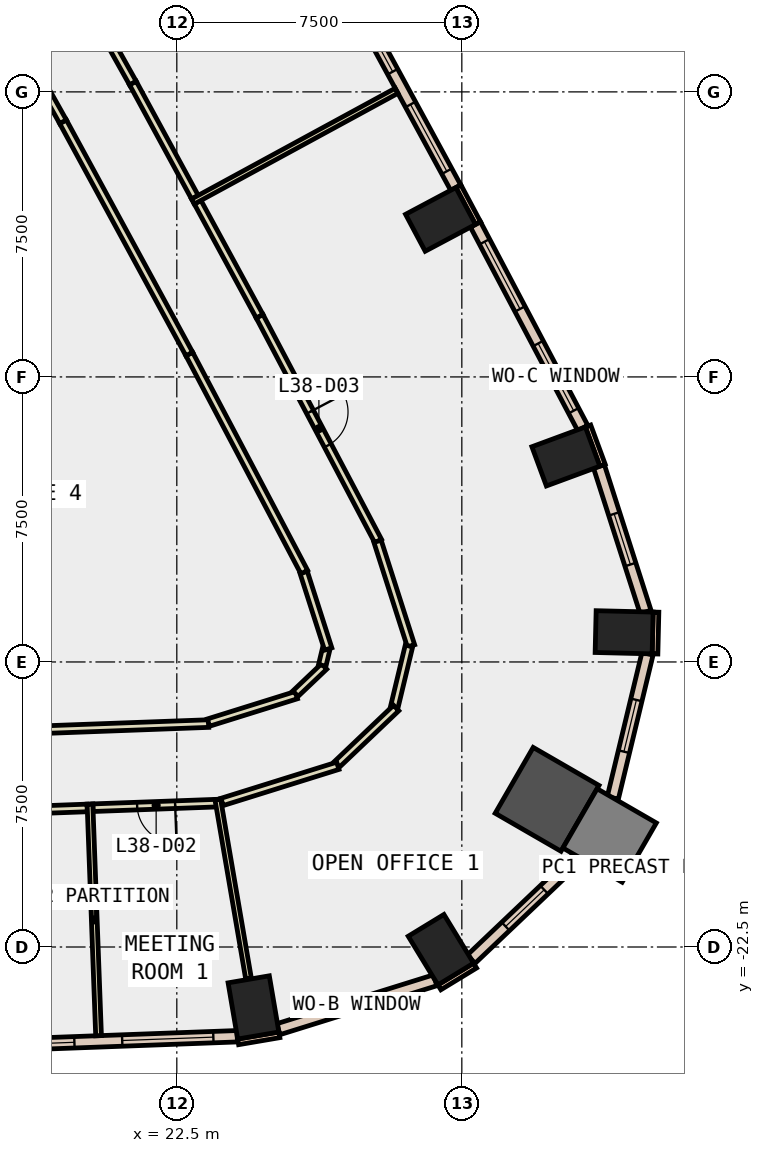
"""IFC4 building model, lengths in metres.
Left out: names, types, materials, properties, quantities, classifications, styles, units other than length and angle.
Written with IfcOpenShell. Run it as: python <this file> out.ifc"""

import sys

from ifc_helpers import new_model, si_unit, direction, frame, frame_2d, origin, origin_2d, place, context, subcontext, project, spatial, rectangle, extrude, element, fill, save


model = new_model("IFC4")
c1 = context("Model", 3, precision=1e-05, world=origin(), true_north=direction((0.0, 1.0)))
c2 = subcontext(c1, "Body", "Model", "MODEL_VIEW")
j1 = project(units=[si_unit("LENGTHUNIT", "METRE"), si_unit("PLANEANGLEUNIT", "RADIAN")], contexts=[c1])
p1 = place(None, origin())
s1 = spatial("IfcSite", under=j1, at=p1, CompositionType="ELEMENT")
p2 = place(p1, origin())
s2 = spatial("IfcBuilding", under=s1, at=p2, CompositionType="ELEMENT")
p3 = place(p2, frame((0.0, 0.0, 171.8)))
s3 = spatial("IfcBuildingStorey", under=s2, at=p3, CompositionType="ELEMENT", Elevation=171.8)
for number, where, z_axis, x_axis in (
    (1, (24.518, -24.09, -0.4), (0.0, 0.0, 1.0), (0.986, 0.168, 0.0)),
    (2, (29.45, -22.571, -0.4), (0.0, 0.0, 1.0), (0.854, 0.521, 0.0)),
):
    element("IfcColumn", number, at=place(p3, frame(where, z_axis=z_axis, x_axis=x_axis)), inside=s3, PredefinedType="COLUMN", context=c2, shape_type="SweptSolid", body=[
        extrude(rectangle(XDim=1.1, YDim=1.5, at=origin_2d()), origin(), (0.0, 0.0, 1.0), 4.2),
    ])
p4 = place(p3, frame((32.244, -18.615, -0.4), z_axis=(0.0, 0.0, 1.0), x_axis=(-0.866025403784, 0.5, 0.0)))
e3 = element("IfcColumn", 3, at=p4, inside=s3, PredefinedType="COLUMN", context=c2, shape_type="SweptSolid", body=[
    extrude(rectangle(XDim=2.0, YDim=2.0, at=origin_2d()), origin(), (0.0, 0.0, 1.0), 4.2),
])
for number, where, z_axis, x_axis in (
    (4, (34.271, -14.219, -0.4), (0.0, 0.0, 1.0), (0.024, 1.0, 0.0)),
    (5, (32.738, -9.593, -0.4), (0.0, 0.0, 1.0), (-0.347, 0.938, 0.0)),
    (6, (29.44, -3.355, -0.4), (0.0, 0.0, 1.0), (-0.47, 0.883, 0.0)),
):
    element("IfcColumn", number, at=place(p3, frame(where, z_axis=z_axis, x_axis=x_axis)), inside=s3, PredefinedType="COLUMN", context=c2, shape_type="SweptSolid", body=[
        extrude(rectangle(XDim=1.1, YDim=1.5, at=origin_2d()), origin(), (0.0, 0.0, 1.0), 4.2),
    ])
p5 = place(p3, frame((33.889, -19.565, -0.4), z_axis=(0.0, 0.0, 1.0), x_axis=(-0.866025403784, 0.5, 0.0)))
e7 = element("IfcColumn", 7, at=p5, inside=s3, PredefinedType="COLUMN", context=c2, shape_type="SweptSolid", body=[
    extrude(rectangle(XDim=1.8, YDim=1.8, at=origin_2d()), origin(), (0.0, 0.0, 1.0), 4.2),
])
for number, where, z_axis, x_axis in (
    (8, (33.702, -9.823, 0.0), (0.0, 0.0, 1.0), (-0.346, 0.938, 0.0)),
    (9, (30.426, -3.453, 0.0), (0.0, 0.0, 1.0), (-0.47, 0.883, 0.0)),
):
    element("IfcWall", number, at=place(p3, frame(where, z_axis=z_axis, x_axis=x_axis)), inside=s3, PredefinedType="STANDARD", context=c2, shape_type="SweptSolid", body=[
        extrude(rectangle(XDim=1.1, YDim=0.15, at=frame_2d((0.55, 0.0))), origin(), (0.0, 0.0, 1.0), 3.8),
    ])
p6 = place(p3, frame((24.114, -24.996, 0.0), z_axis=(0.0, 0.0, 1.0), x_axis=(0.985763338892, 0.168138751323, 0.0)))
e10 = element("IfcWall", 10, at=p6, inside=s3, PredefinedType="STANDARD", context=c2, shape_type="SweptSolid", body=[
    extrude(rectangle(XDim=1.101, YDim=0.15, at=frame_2d((0.55, 0.0))), origin(), (0.0, 0.0, 1.0), 3.8),
])
p7 = place(p3, frame((29.41, -23.561, 0.0), z_axis=(0.0, 0.0, 1.0), x_axis=(0.854065628997, 0.520165263514, 0.0)))
e11 = element("IfcWall", 11, at=p7, inside=s3, PredefinedType="STANDARD", context=c2, shape_type="SweptSolid", body=[
    extrude(rectangle(XDim=1.1, YDim=0.15, at=frame_2d((0.55, 0.0))), origin(), (0.0, 0.0, 1.0), 3.8),
])
p8 = place(p3, frame((35.083, -14.789, 0.0), z_axis=(0.0, 0.0, 1.0), x_axis=(0.023517683673, 0.999723421029, 0.0)))
e12 = element("IfcWall", 12, at=p8, inside=s3, PredefinedType="STANDARD", context=c2, shape_type="SweptSolid", body=[
    extrude(rectangle(XDim=1.1, YDim=0.15, at=frame_2d((0.55, 0.0))), origin(), (0.0, 0.0, 1.0), 3.8),
])
p9 = place(p3, frame((16.778, -25.12, 0.0), z_axis=(0.0, 0.0, 1.0), x_axis=(0.999307730926, 0.037202942236, 0.0)))
e13 = element("IfcWall", 13, at=p9, inside=s3, PredefinedType="STANDARD", context=c2, shape_type="SweptSolid", body=[
    extrude(rectangle(XDim=7.317, YDim=0.3, at=frame_2d((3.659, 0.0))), origin(), (0.0, 0.0, 1.0), 3.8),
])
p10 = place(p9, frame((0.629, 0.0, 0.9)))
e14 = element("IfcOpeningElement", 14, at=p10, cuts=e13, PredefinedType="OPENING", context=c2, shape_type="SweptSolid", body=[
    extrude(rectangle(XDim=2.4, YDim=2.6, at=frame_2d((1.2, 1.3))), frame((0.0, 0.16, 0.0), z_axis=(0.0, -1.0, 0.0), x_axis=(1.0, 0.0, 0.0)), (0.0, 0.0, 1.0), 0.32),
])
p11 = place(p9, frame((4.288, 0.0, 0.9)))
e15 = element("IfcOpeningElement", 15, at=p11, cuts=e13, PredefinedType="OPENING", context=c2, shape_type="SweptSolid", body=[
    extrude(rectangle(XDim=2.4, YDim=2.6, at=frame_2d((1.2, 1.3))), frame((0.0, 0.16, 0.0), z_axis=(0.0, -1.0, 0.0), x_axis=(1.0, 0.0, 0.0)), (0.0, 0.0, 1.0), 0.32),
])
p12 = place(p3, frame((25.172, -24.663, 0.0), z_axis=(0.0, 0.0, 1.0), x_axis=(0.954628614874, 0.29779893832, 0.0)))
e16 = element("IfcWall", 16, at=p12, inside=s3, PredefinedType="STANDARD", context=c2, shape_type="SweptSolid", body=[
    extrude(rectangle(XDim=4.322, YDim=0.3, at=frame_2d((2.161, 0.0))), origin(), (0.0, 0.0, 1.0), 3.8),
])
p13 = place(p12, frame((1.461, 0.0, 0.9)))
e17 = element("IfcOpeningElement", 17, at=p13, cuts=e16, PredefinedType="OPENING", context=c2, shape_type="SweptSolid", body=[
    extrude(rectangle(XDim=1.4, YDim=2.6, at=frame_2d((0.7, 1.3))), frame((0.0, 0.16, 0.0), z_axis=(0.0, -1.0, 0.0), x_axis=(1.0, 0.0, 0.0)), (0.0, 0.0, 1.0), 0.32),
])
p14 = place(p3, frame((30.246, -22.821, 0.0), z_axis=(0.0, 0.0, 1.0), x_axis=(0.724807239831, 0.688951714628, 0.0)))
e18 = element("IfcWall", 18, at=p14, inside=s3, PredefinedType="STANDARD", context=c2, shape_type="SweptSolid", body=[
    extrude(rectangle(XDim=3.902, YDim=0.3, at=frame_2d((1.951, 0.0))), origin(), (0.0, 0.0, 1.0), 3.8),
])
p15 = place(p14, frame((1.251, 0.0, 0.9)))
e19 = element("IfcOpeningElement", 19, at=p15, cuts=e18, PredefinedType="OPENING", context=c2, shape_type="SweptSolid", body=[
    extrude(rectangle(XDim=1.4, YDim=2.6, at=frame_2d((0.7, 1.3))), frame((0.0, 0.16, 0.0), z_axis=(0.0, -1.0, 0.0), x_axis=(1.0, 0.0, 0.0)), (0.0, 0.0, 1.0), 0.32),
])
p16 = place(p3, frame((33.973, -18.575, 0.0), z_axis=(0.0, 0.0, 1.0), x_axis=(0.234102046927, 0.972212030179, 0.0)))
e20 = element("IfcWall", 20, at=p16, inside=s3, PredefinedType="STANDARD", context=c2, shape_type="SweptSolid", body=[
    extrude(rectangle(XDim=3.9, YDim=0.3, at=frame_2d((1.95, 0.0))), origin(), (0.0, 0.0, 1.0), 3.8),
])
p17 = place(p16, frame((1.25, 0.0, 0.9)))
e21 = element("IfcOpeningElement", 21, at=p17, cuts=e20, PredefinedType="OPENING", context=c2, shape_type="SweptSolid", body=[
    extrude(rectangle(XDim=1.4, YDim=2.6, at=frame_2d((0.7, 1.3))), frame((0.0, 0.16, 0.0), z_axis=(0.0, -1.0, 0.0), x_axis=(1.0, 0.0, 0.0)), (0.0, 0.0, 1.0), 0.32),
])
p18 = place(p3, frame((34.835, -13.684, 0.0), z_axis=(0.0, 0.0, 1.0), x_axis=(-0.305018133869, 0.952346543025, 0.0)))
e22 = element("IfcWall", 22, at=p18, inside=s3, PredefinedType="STANDARD", context=c2, shape_type="SweptSolid", body=[
    extrude(rectangle(XDim=4.02, YDim=0.3, at=frame_2d((2.01, 0.0))), origin(), (0.0, 0.0, 1.0), 3.8),
])
p19 = place(p18, frame((1.31, 0.0, 0.9)))
e23 = element("IfcOpeningElement", 23, at=p19, cuts=e22, PredefinedType="OPENING", context=c2, shape_type="SweptSolid", body=[
    extrude(rectangle(XDim=1.4, YDim=2.6, at=frame_2d((0.7, 1.3))), frame((0.0, 0.16, 0.0), z_axis=(0.0, -1.0, 0.0), x_axis=(1.0, 0.0, 0.0)), (0.0, 0.0, 1.0), 0.32),
])
p20 = place(p3, frame((33.182, -8.844, 0.0), z_axis=(0.0, 0.0, 1.0), x_axis=(-0.466399410196, 0.884574242316, 0.0)))
e24 = element("IfcWall", 24, at=p20, inside=s3, PredefinedType="STANDARD", context=c2, shape_type="SweptSolid", body=[
    extrude(rectangle(XDim=6.055, YDim=0.3, at=frame_2d((3.027, 0.0))), origin(), (0.0, 0.0, 1.0), 3.8),
])
p21 = place(p20, frame((0.514, 0.0, 0.9)))
e25 = element("IfcOpeningElement", 25, at=p21, cuts=e24, PredefinedType="OPENING", context=c2, shape_type="SweptSolid", body=[
    extrude(rectangle(XDim=2.0, YDim=2.6, at=frame_2d((1.0, 1.3))), frame((0.0, 0.16, 0.0), z_axis=(0.0, -1.0, 0.0), x_axis=(1.0, 0.0, 0.0)), (0.0, 0.0, 1.0), 0.32),
])
p22 = place(p20, frame((3.541, 0.0, 0.9)))
e26 = element("IfcOpeningElement", 26, at=p22, cuts=e24, PredefinedType="OPENING", context=c2, shape_type="SweptSolid", body=[
    extrude(rectangle(XDim=2.0, YDim=2.6, at=frame_2d((1.0, 1.3))), frame((0.0, 0.16, 0.0), z_axis=(0.0, -1.0, 0.0), x_axis=(1.0, 0.0, 0.0)), (0.0, 0.0, 1.0), 0.32),
])
p23 = place(p3, frame((29.839, -2.52, 0.0), z_axis=(0.0, 0.0, 1.0), x_axis=(-0.477555226268, 0.878601733361, 0.0)))
e27 = element("IfcWall", 27, at=p23, inside=s3, PredefinedType="STANDARD", context=c2, shape_type="SweptSolid", body=[
    extrude(rectangle(XDim=5.964, YDim=0.3, at=frame_2d((2.982, 0.0))), origin(), (0.0, 0.0, 1.0), 3.8),
])
p24 = place(p23, frame((0.491, 0.0, 0.9)))
e28 = element("IfcOpeningElement", 28, at=p24, cuts=e27, PredefinedType="OPENING", context=c2, shape_type="SweptSolid", body=[
    extrude(rectangle(XDim=2.0, YDim=2.6, at=frame_2d((1.0, 1.3))), frame((0.0, 0.16, 0.0), z_axis=(0.0, -1.0, 0.0), x_axis=(1.0, 0.0, 0.0)), (0.0, 0.0, 1.0), 0.32),
])
p25 = place(p23, frame((3.473, 0.0, 0.9)))
e29 = element("IfcOpeningElement", 29, at=p25, cuts=e27, PredefinedType="OPENING", context=c2, shape_type="SweptSolid", body=[
    extrude(rectangle(XDim=2.0, YDim=2.6, at=frame_2d((1.0, 1.3))), frame((0.0, 0.16, 0.0), z_axis=(0.0, -1.0, 0.0), x_axis=(1.0, 0.0, 0.0)), (0.0, 0.0, 1.0), 0.32),
])
p26 = place(p3, frame((15.987, -16.893, 0.0), z_axis=(0.0, 0.0, 1.0), x_axis=(0.999316060953, 0.036978511606, 0.0)))
e30 = element("IfcWall", 30, at=p26, inside=s3, PredefinedType="PARTITIONING", context=c2, shape_type="SweptSolid", body=[
    extrude(rectangle(XDim=7.355, YDim=0.2, at=frame_2d((3.677, 0.0))), origin(), (0.0, 0.0, 1.0), 3.8),
])
p27 = place(p3, frame((23.333, -16.595, 0.0), z_axis=(0.0, 0.0, 1.0), x_axis=(0.95454810771, 0.298056890655, 0.0)))
e31 = element("IfcWall", 31, at=p27, inside=s3, PredefinedType="PARTITIONING", context=c2, shape_type="SweptSolid", body=[
    extrude(rectangle(XDim=2.422, YDim=0.2, at=frame_2d((1.211, 0.0))), origin(), (0.0, 0.0, 1.0), 3.8),
])
p28 = place(p3, frame((25.622, -15.834, 0.0), z_axis=(0.0, 0.0, 1.0), x_axis=(0.725069777966, 0.688675407634, 0.0)))
e32 = element("IfcWall", 32, at=p28, inside=s3, PredefinedType="PARTITIONING", context=c2, shape_type="SweptSolid", body=[
    extrude(rectangle(XDim=1.04, YDim=0.2, at=frame_2d((0.52, 0.0))), origin(), (0.0, 0.0, 1.0), 3.8),
])
p29 = place(p3, frame((26.327, -15.089, 0.0), z_axis=(0.0, 0.0, 1.0), x_axis=(0.233414791565, 0.972377259647, 0.0)))
e33 = element("IfcWall", 33, at=p29, inside=s3, PredefinedType="PARTITIONING", context=c2, shape_type="SweptSolid", body=[
    extrude(rectangle(XDim=0.441, YDim=0.2, at=frame_2d((0.221, 0.0))), origin(), (0.0, 0.0, 1.0), 3.8),
])
p30 = place(p3, frame((26.484, -14.658, 0.0), z_axis=(0.0, 0.0, 1.0), x_axis=(-0.305169069368, 0.952298188122, 0.0)))
e34 = element("IfcWall", 34, at=p30, inside=s3, PredefinedType="PARTITIONING", context=c2, shape_type="SweptSolid", body=[
    extrude(rectangle(XDim=2.117, YDim=0.2, at=frame_2d((1.059, 0.0))), origin(), (0.0, 0.0, 1.0), 3.8),
])
p31 = place(p3, frame((25.854, -12.635, 0.0), z_axis=(0.0, 0.0, 1.0), x_axis=(-0.466483047656, 0.884530138689, 0.0)))
e35 = element("IfcWall", 35, at=p31, inside=s3, PredefinedType="PARTITIONING", context=c2, shape_type="SweptSolid", body=[
    extrude(rectangle(XDim=6.487, YDim=0.2, at=frame_2d((3.244, 0.0))), origin(), (0.0, 0.0, 1.0), 3.8),
])
p32 = place(p3, frame((22.828, -6.897, 0.0), z_axis=(0.0, 0.0, 1.0), x_axis=(-0.477513909405, 0.878624189472, 0.0)))
e36 = element("IfcWall", 36, at=p32, inside=s3, PredefinedType="PARTITIONING", context=c2, shape_type="SweptSolid", body=[
    extrude(rectangle(XDim=6.956, YDim=0.2, at=frame_2d((3.478, 0.0))), origin(), (0.0, 0.0, 1.0), 3.8),
])
p33 = place(p3, frame((19.506, -0.785, 0.0), z_axis=(0.0, 0.0, 1.0), x_axis=(-0.489049603292, 0.872255974769, 0.0)))
e37 = element("IfcWall", 37, at=p33, inside=s3, PredefinedType="PARTITIONING", context=c2, shape_type="SweptSolid", body=[
    extrude(rectangle(XDim=3.082, YDim=0.2, at=frame_2d((1.541, 0.0))), origin(), (0.0, 0.0, 1.0), 3.8),
])
p34 = place(p3, frame((20.143, -18.841, 0.0), z_axis=(0.0, 0.0, 1.0), x_axis=(-0.999321592708, -0.036828716339, 0.0)))
e38 = element("IfcWall", 38, at=p34, inside=s3, PredefinedType="PARTITIONING", context=c2, shape_type="SweptSolid", body=[
    extrude(rectangle(XDim=4.097, YDim=0.2, at=frame_2d((2.048, 0.0))), origin(), (0.0, 0.0, 1.0), 3.8),
])
p35 = place(p3, frame((23.62, -18.712, 0.0), z_axis=(0.0, 0.0, 1.0), x_axis=(-0.999316841287, -0.03695741767, 0.0)))
e39 = element("IfcWall", 39, at=p35, inside=s3, PredefinedType="PARTITIONING", context=c2, shape_type="SweptSolid", body=[
    extrude(rectangle(XDim=3.329, YDim=0.2, at=frame_2d((1.665, 0.0))), origin(), (0.0, 0.0, 1.0), 3.8),
])
p36 = place(p35, frame((1.165, 0.0, 0.0)))
e40 = element("IfcOpeningElement", 40, at=p36, cuts=e39, PredefinedType="OPENING", context=c2, shape_type="SweptSolid", body=[
    extrude(rectangle(XDim=1.0, YDim=2.1, at=frame_2d((0.5, 1.05))), frame((0.0, 0.11, 0.0), z_axis=(0.0, -1.0, 0.0), x_axis=(1.0, 0.0, 0.0)), (0.0, 0.0, 1.0), 0.22),
])
p37 = place(p3, frame((23.048, -2.903, 0.0), z_axis=(0.0, 0.0, 1.0), x_axis=(0.477470161865, -0.878647963936, 0.0)))
e41 = element("IfcWall", 41, at=p37, inside=s3, PredefinedType="PARTITIONING", context=c2, shape_type="SweptSolid", body=[
    extrude(rectangle(XDim=3.418, YDim=0.2, at=frame_2d((1.709, 0.0))), origin(), (0.0, 0.0, 1.0), 3.8),
])
p38 = place(p3, frame((24.68, -5.906, 0.0), z_axis=(0.0, 0.0, 1.0), x_axis=(0.466450727507, -0.884547182918, 0.0)))
e42 = element("IfcWall", 42, at=p38, inside=s3, PredefinedType="PARTITIONING", context=c2, shape_type="SweptSolid", body=[
    extrude(rectangle(XDim=6.685, YDim=0.2, at=frame_2d((3.342, 0.0))), origin(), (0.0, 0.0, 1.0), 3.8),
])
p39 = place(p38, frame((2.842, 0.0, 0.0)))
e43 = element("IfcOpeningElement", 43, at=p39, cuts=e42, PredefinedType="OPENING", context=c2, shape_type="SweptSolid", body=[
    extrude(rectangle(XDim=1.0, YDim=2.1, at=frame_2d((0.5, 1.05))), frame((0.0, 0.11, 0.0), z_axis=(0.0, -1.0, 0.0), x_axis=(1.0, 0.0, 0.0)), (0.0, 0.0, 1.0), 0.22),
])
p40 = place(p3, frame((27.782, -11.825, 0.0), z_axis=(0.0, 0.0, 1.0), x_axis=(0.304925942137, -0.952376065329, 0.0)))
e44 = element("IfcWall", 44, at=p40, inside=s3, PredefinedType="PARTITIONING", context=c2, shape_type="SweptSolid", body=[
    extrude(rectangle(XDim=2.89, YDim=0.2, at=frame_2d((1.445, 0.0))), origin(), (0.0, 0.0, 1.0), 3.8),
])
p41 = place(p3, frame((28.609, -14.579, 0.0), z_axis=(0.0, 0.0, 1.0), x_axis=(-0.233826017197, -0.972278454807, 0.0)))
e45 = element("IfcWall", 45, at=p41, inside=s3, PredefinedType="PARTITIONING", context=c2, shape_type="SweptSolid", body=[
    extrude(rectangle(XDim=1.651, YDim=0.2, at=frame_2d((0.825, 0.0))), origin(), (0.0, 0.0, 1.0), 3.8),
])
p42 = place(p3, frame((28.272, -16.212, 0.0), z_axis=(0.0, 0.0, 1.0), x_axis=(-0.724712974479, -0.689050872303, 0.0)))
e46 = element("IfcWall", 46, at=p42, inside=s3, PredefinedType="PARTITIONING", context=c2, shape_type="SweptSolid", body=[
    extrude(rectangle(XDim=2.15, YDim=0.2, at=frame_2d((1.075, 0.0))), origin(), (0.0, 0.0, 1.0), 3.8),
])
p43 = place(p3, frame((26.737, -17.732, 0.0), z_axis=(0.0, 0.0, 1.0), x_axis=(-0.954546657381, -0.298061535398, 0.0)))
e47 = element("IfcWall", 47, at=p43, inside=s3, PredefinedType="PARTITIONING", context=c2, shape_type="SweptSolid", body=[
    extrude(rectangle(XDim=3.191, YDim=0.2, at=frame_2d((1.596, 0.0))), origin(), (0.0, 0.0, 1.0), 3.8),
])
p44 = place(p3, frame((17.93, 6.321, 0.0), z_axis=(0.0, 0.0, 1.0), x_axis=(0.489044053781, -0.872259086202, 0.0)))
e48 = element("IfcWall", 48, at=p44, inside=s3, PredefinedType="PARTITIONING", context=c2, shape_type="SweptSolid", body=[
    extrude(rectangle(XDim=6.983, YDim=0.2, at=frame_2d((3.492, 0.0))), origin(), (0.0, 0.0, 1.0), 3.8),
])
p45 = place(p44, frame((2.991, 0.0, 0.0)))
e49 = element("IfcOpeningElement", 49, at=p45, cuts=e48, PredefinedType="OPENING", context=c2, shape_type="SweptSolid", body=[
    extrude(rectangle(XDim=1.0, YDim=2.1, at=frame_2d((0.5, 1.05))), frame((0.0, 0.11, 0.0), z_axis=(0.0, -1.0, 0.0), x_axis=(1.0, 0.0, 0.0)), (0.0, 0.0, 1.0), 0.22),
])
p46 = place(p3, frame((21.345, 0.23, 0.0), z_axis=(0.0, 0.0, 1.0), x_axis=(0.477544508622, -0.878607558746, 0.0)))
e50 = element("IfcWall", 50, at=p46, inside=s3, PredefinedType="PARTITIONING", context=c2, shape_type="SweptSolid", body=[
    extrude(rectangle(XDim=3.416, YDim=0.2, at=frame_2d((1.708, 0.0))), origin(), (0.0, 0.0, 1.0), 3.8),
])
p47 = place(p3, frame((20.215, -18.738, 0.0), z_axis=(0.0, 0.0, 1.0), x_axis=(0.037020542149, -0.999314504778, 0.0)))
e51 = element("IfcWall", 51, at=p47, inside=s3, PredefinedType="PARTITIONING", context=c2, shape_type="SweptSolid", body=[
    extrude(rectangle(XDim=6.1, YDim=0.15, at=frame_2d((3.05, 0.0))), origin(), (0.0, 0.0, 1.0), 3.8),
])
p48 = place(p3, frame((23.578, -18.614, 0.0), z_axis=(0.0, 0.0, 1.0), x_axis=(0.169054430835, -0.985606716401, 0.0)))
e52 = element("IfcWall", 52, at=p48, inside=s3, PredefinedType="PARTITIONING", context=c2, shape_type="SweptSolid", body=[
    extrude(rectangle(XDim=4.786, YDim=0.15, at=frame_2d((2.393, 0.0))), origin(), (0.0, 0.0, 1.0), 3.8),
])
p49 = place(p3, frame((22.924, -2.885, 0.0), z_axis=(0.0, 0.0, 1.0), x_axis=(0.878512782244, 0.477718841406, 0.0)))
e53 = element("IfcWall", 53, at=p49, inside=s3, PredefinedType="PARTITIONING", context=c2, shape_type="SweptSolid", body=[
    extrude(rectangle(XDim=6.1, YDim=0.15, at=frame_2d((3.05, 0.0))), origin(), (0.0, 0.0, 1.0), 3.8),
])
p50 = place(p10, origin())
e54 = element("IfcWindow", 54, at=p50, inside=s3, PartitioningType="SINGLE_PANEL", PredefinedType="WINDOW", context=c2, shape_type="SweptSolid", body=[
    extrude(rectangle(XDim=2.4, YDim=2.6, at=frame_2d((1.2, 1.3))), frame((0.0, 0.03, 0.0), z_axis=(0.0, -1.0, 0.0), x_axis=(1.0, 0.0, 0.0)), (0.0, 0.0, 1.0), 0.06),
])
fill(e14, e54)
p51 = place(p11, origin())
e55 = element("IfcWindow", 55, at=p51, inside=s3, PartitioningType="SINGLE_PANEL", PredefinedType="WINDOW", context=c2, shape_type="SweptSolid", body=[
    extrude(rectangle(XDim=2.4, YDim=2.6, at=frame_2d((1.2, 1.3))), frame((0.0, 0.03, 0.0), z_axis=(0.0, -1.0, 0.0), x_axis=(1.0, 0.0, 0.0)), (0.0, 0.0, 1.0), 0.06),
])
fill(e15, e55)
p52 = place(p13, origin())
e56 = element("IfcWindow", 56, at=p52, inside=s3, PartitioningType="SINGLE_PANEL", PredefinedType="WINDOW", context=c2, shape_type="SweptSolid", body=[
    extrude(rectangle(XDim=1.4, YDim=2.6, at=frame_2d((0.7, 1.3))), frame((0.0, 0.03, 0.0), z_axis=(0.0, -1.0, 0.0), x_axis=(1.0, 0.0, 0.0)), (0.0, 0.0, 1.0), 0.06),
])
fill(e17, e56)
p53 = place(p15, origin())
e57 = element("IfcWindow", 57, at=p53, inside=s3, PartitioningType="SINGLE_PANEL", PredefinedType="WINDOW", context=c2, shape_type="SweptSolid", body=[
    extrude(rectangle(XDim=1.4, YDim=2.6, at=frame_2d((0.7, 1.3))), frame((0.0, 0.03, 0.0), z_axis=(0.0, -1.0, 0.0), x_axis=(1.0, 0.0, 0.0)), (0.0, 0.0, 1.0), 0.06),
])
fill(e19, e57)
p54 = place(p17, origin())
e58 = element("IfcWindow", 58, at=p54, inside=s3, PartitioningType="SINGLE_PANEL", PredefinedType="WINDOW", context=c2, shape_type="SweptSolid", body=[
    extrude(rectangle(XDim=1.4, YDim=2.6, at=frame_2d((0.7, 1.3))), frame((0.0, 0.03, 0.0), z_axis=(0.0, -1.0, 0.0), x_axis=(1.0, 0.0, 0.0)), (0.0, 0.0, 1.0), 0.06),
])
fill(e21, e58)
p55 = place(p19, origin())
e59 = element("IfcWindow", 59, at=p55, inside=s3, PartitioningType="SINGLE_PANEL", PredefinedType="WINDOW", context=c2, shape_type="SweptSolid", body=[
    extrude(rectangle(XDim=1.4, YDim=2.6, at=frame_2d((0.7, 1.3))), frame((0.0, 0.03, 0.0), z_axis=(0.0, -1.0, 0.0), x_axis=(1.0, 0.0, 0.0)), (0.0, 0.0, 1.0), 0.06),
])
fill(e23, e59)
p56 = place(p21, origin())
e60 = element("IfcWindow", 60, at=p56, inside=s3, PartitioningType="SINGLE_PANEL", PredefinedType="WINDOW", context=c2, shape_type="SweptSolid", body=[
    extrude(rectangle(XDim=2.0, YDim=2.6, at=frame_2d((1.0, 1.3))), frame((0.0, 0.03, 0.0), z_axis=(0.0, -1.0, 0.0), x_axis=(1.0, 0.0, 0.0)), (0.0, 0.0, 1.0), 0.06),
])
fill(e25, e60)
p57 = place(p22, origin())
e61 = element("IfcWindow", 61, at=p57, inside=s3, PartitioningType="SINGLE_PANEL", PredefinedType="WINDOW", context=c2, shape_type="SweptSolid", body=[
    extrude(rectangle(XDim=2.0, YDim=2.6, at=frame_2d((1.0, 1.3))), frame((0.0, 0.03, 0.0), z_axis=(0.0, -1.0, 0.0), x_axis=(1.0, 0.0, 0.0)), (0.0, 0.0, 1.0), 0.06),
])
fill(e26, e61)
p58 = place(p24, origin())
e62 = element("IfcWindow", 62, at=p58, inside=s3, PartitioningType="SINGLE_PANEL", PredefinedType="WINDOW", context=c2, shape_type="SweptSolid", body=[
    extrude(rectangle(XDim=2.0, YDim=2.6, at=frame_2d((1.0, 1.3))), frame((0.0, 0.03, 0.0), z_axis=(0.0, -1.0, 0.0), x_axis=(1.0, 0.0, 0.0)), (0.0, 0.0, 1.0), 0.06),
])
fill(e28, e62)
p59 = place(p25, origin())
e63 = element("IfcWindow", 63, at=p59, inside=s3, PartitioningType="SINGLE_PANEL", PredefinedType="WINDOW", context=c2, shape_type="SweptSolid", body=[
    extrude(rectangle(XDim=2.0, YDim=2.6, at=frame_2d((1.0, 1.3))), frame((0.0, 0.03, 0.0), z_axis=(0.0, -1.0, 0.0), x_axis=(1.0, 0.0, 0.0)), (0.0, 0.0, 1.0), 0.06),
])
fill(e29, e63)
p60 = place(p36, origin())
e64 = element("IfcDoor", 64, at=p60, inside=s3, OperationType="SINGLE_SWING_LEFT", PredefinedType="DOOR", context=c2, shape_type="SweptSolid", body=[
    extrude(rectangle(XDim=1.0, YDim=2.1, at=frame_2d((0.5, 1.05))), frame((0.0, 0.025, 0.0), z_axis=(0.0, -1.0, 0.0), x_axis=(1.0, 0.0, 0.0)), (0.0, 0.0, 1.0), 0.05),
])
fill(e40, e64)
p61 = place(p39, origin())
e65 = element("IfcDoor", 65, at=p61, inside=s3, OperationType="SINGLE_SWING_LEFT", PredefinedType="DOOR", context=c2, shape_type="SweptSolid", body=[
    extrude(rectangle(XDim=1.0, YDim=2.1, at=frame_2d((0.5, 1.05))), frame((0.0, 0.025, 0.0), z_axis=(0.0, -1.0, 0.0), x_axis=(1.0, 0.0, 0.0)), (0.0, 0.0, 1.0), 0.05),
])
fill(e43, e65)
save(model, sys.argv[1])
